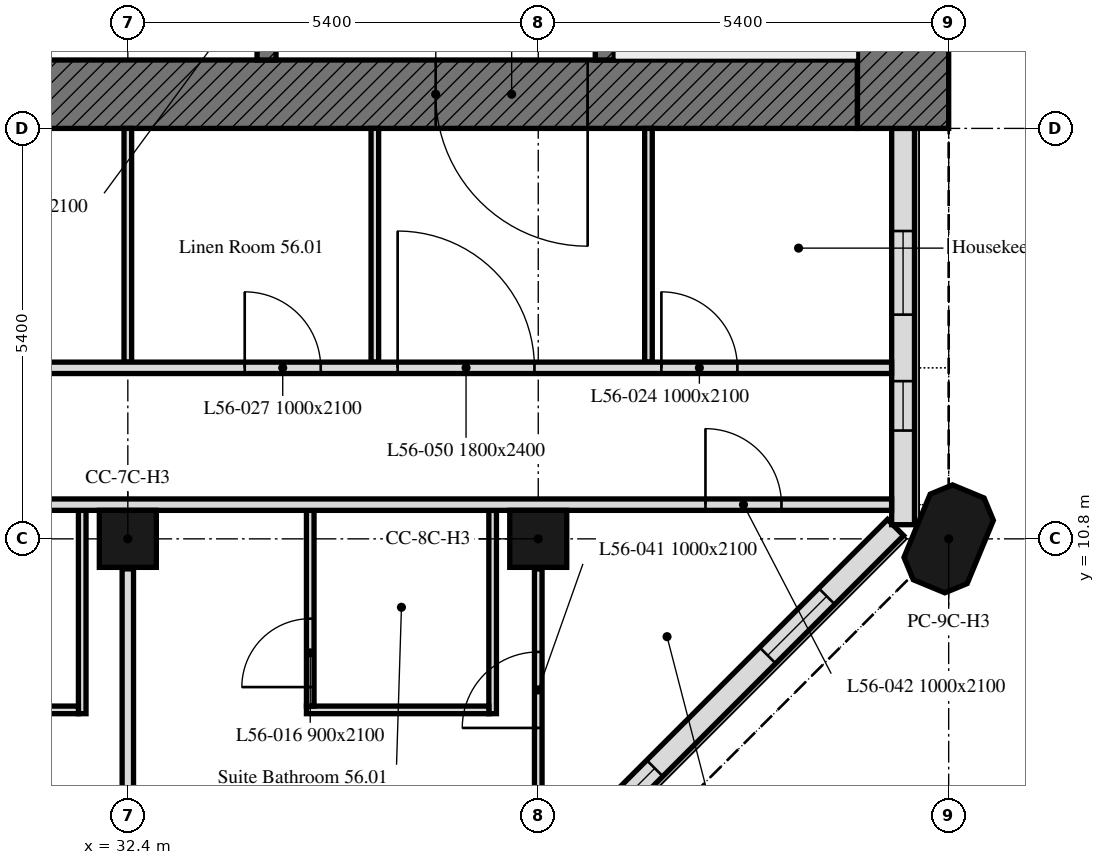
"""IFC4 building model, lengths in metres.
Left out: names, types, materials, properties, quantities, classifications, styles, units other than length and angle.
Written with IfcOpenShell. Run it as: python <this file> out.ifc"""

import sys

from ifc_helpers import new_model, si_unit, direction, frame, frame_2d, origin, origin_2d, place, context, subcontext, project, spatial, polyline, rectangle, outline, extrude, element, fill, save


model = new_model("IFC4")
c1 = context("Model", 3, precision=1e-05, world=origin(), true_north=direction((0.0, 1.0)))
c2 = subcontext(c1, "Body", "Model", "MODEL_VIEW")
j1 = project(units=[si_unit("LENGTHUNIT", "METRE"), si_unit("PLANEANGLEUNIT", "RADIAN")], contexts=[c1])
p1 = place(None, origin())
s1 = spatial("IfcSite", under=j1, at=p1, CompositionType="ELEMENT")
p2 = place(p1, origin())
s2 = spatial("IfcBuilding", under=s1, at=p2, CompositionType="ELEMENT")
p3 = place(p2, frame((0.0, 0.0, 223.6)))
s3 = spatial("IfcBuildingStorey", under=s2, at=p3, CompositionType="ELEMENT", Elevation=223.6)
for number, where, z_axis, x_axis in (
    (1, (32.4, 10.8, 0.0), (0.0, 0.0, 1.0), (1.0, 0.0, 0.0)),
    (2, (37.8, 10.8, 0.0), (0.0, 0.0, 1.0), (1.0, 0.0, 0.0)),
):
    element("IfcColumn", number, at=place(p3, frame(where, z_axis=z_axis, x_axis=x_axis)), inside=s3, PredefinedType="COLUMN", context=c2, shape_type="SweptSolid", body=[
        extrude(rectangle(XDim=0.75, YDim=0.75, at=origin_2d()), origin(), (0.0, 0.0, 1.0), 3.0),
    ])
p4 = place(p3, frame((43.2, 10.8, 0.0), z_axis=(0.0, 0.0, 1.0), x_axis=(0.382683432365, 0.923879532511, 0.0)))
e3 = element("IfcColumn", 3, at=p4, inside=s3, PredefinedType="COLUMN", context=c2, shape_type="SweptSolid", body=[
    extrude(outline(polyline([(-0.45, -0.45), (0.45, -0.45), (0.675, -0.225), (0.675, 0.225), (0.45, 0.45), (-0.45, 0.45), (-0.675, 0.225), (-0.675, -0.225), (-0.45, -0.45)])), origin(), (0.0, 0.0, 1.0), 3.0),
])
p5 = place(p3, frame((37.65, 6.099, 0.0), z_axis=(0.0, 0.0, 1.0), x_axis=(0.707106781187, 0.707106781187, 0.0)))
e4 = element("IfcWall", 4, at=p5, inside=s3, PredefinedType="SOLIDWALL", context=c2, shape_type="SweptSolid", body=[
    extrude(rectangle(XDim=6.86, YDim=0.3, at=frame_2d((3.43, 0.0))), origin(), (0.0, 0.0, 1.0), 3.0),
])
p6 = place(p5, frame((1.28, 0.0, 0.9)))
e5 = element("IfcOpeningElement", 5, at=p6, cuts=e4, PredefinedType="OPENING", context=c2, shape_type="SweptSolid", body=[
    extrude(rectangle(XDim=1.1, YDim=1.7, at=frame_2d((0.55, 0.85))), frame((0.0, 0.16, 0.0), z_axis=(0.0, -1.0, 0.0), x_axis=(1.0, 0.0, 0.0)), (0.0, 0.0, 1.0), 0.32),
])
p7 = place(p5, frame((4.48, 0.0, 0.9)))
e6 = element("IfcOpeningElement", 6, at=p7, cuts=e4, PredefinedType="OPENING", context=c2, shape_type="SweptSolid", body=[
    extrude(rectangle(XDim=1.1, YDim=1.7, at=frame_2d((0.55, 0.85))), frame((0.0, 0.16, 0.0), z_axis=(0.0, -1.0, 0.0), x_axis=(1.0, 0.0, 0.0)), (0.0, 0.0, 1.0), 0.32),
])
p8 = place(p3, frame((42.6, 10.986, 0.0), z_axis=(0.0, 0.0, 1.0), x_axis=(0.0, 1.0, 0.0)))
e7 = element("IfcWall", 7, at=p8, inside=s3, PredefinedType="SOLIDWALL", context=c2, shape_type="SweptSolid", body=[
    extrude(rectangle(XDim=5.214, YDim=0.3, at=frame_2d((2.607, 0.0))), origin(), (0.0, 0.0, 1.0), 3.0),
])
p9 = place(p8, frame((1.239, 0.0, 0.9)))
e8 = element("IfcOpeningElement", 8, at=p9, cuts=e7, PredefinedType="OPENING", context=c2, shape_type="SweptSolid", body=[
    extrude(rectangle(XDim=0.65, YDim=1.7, at=frame_2d((0.325, 0.85))), frame((0.0, 0.16, 0.0), z_axis=(0.0, -1.0, 0.0), x_axis=(1.0, 0.0, 0.0)), (0.0, 0.0, 1.0), 0.32),
])
p10 = place(p8, frame((2.764, 0.0, 0.9)))
e9 = element("IfcOpeningElement", 9, at=p10, cuts=e7, PredefinedType="OPENING", context=c2, shape_type="SweptSolid", body=[
    extrude(rectangle(XDim=1.1, YDim=1.7, at=frame_2d((0.55, 0.85))), frame((0.0, 0.16, 0.0), z_axis=(0.0, -1.0, 0.0), x_axis=(1.0, 0.0, 0.0)), (0.0, 0.0, 1.0), 0.32),
])
p11 = place(p3, frame((42.0, 16.65, 0.0), z_axis=(0.0, 0.0, 1.0), x_axis=(-1.0, 0.0, 0.0)))
e10 = element("IfcWall", 10, at=p11, inside=s3, PredefinedType="SOLIDWALL", context=c2, shape_type="SweptSolid", body=[
    extrude(rectangle(XDim=11.1, YDim=0.9, at=frame_2d((5.55, 0.0))), origin(), (0.0, 0.0, 1.0), 3.0),
])
p12 = place(p11, frame((3.55, 0.0, 0.0)))
e11 = element("IfcOpeningElement", 11, at=p12, cuts=e10, PredefinedType="OPENING", context=c2, shape_type="SweptSolid", body=[
    extrude(rectangle(XDim=2.0, YDim=2.4, at=frame_2d((1.0, 1.2))), frame((0.0, 0.45, 0.0), z_axis=(0.0, -1.0, 0.0), x_axis=(1.0, 0.0, 0.0)), (0.0, 0.0, 1.0), 0.9),
])
p13 = place(p3, frame((42.6, 32.4, 0.0), z_axis=(0.0, 0.0, 1.0), x_axis=(0.0, -1.0, 0.0)))
e12 = element("IfcWall", 12, at=p13, inside=s3, PredefinedType="SOLIDWALL", context=c2, shape_type="SweptSolid", body=[
    extrude(rectangle(XDim=16.2, YDim=1.2, at=frame_2d((8.1, 0.0))), origin(), (0.0, 0.0, 1.0), 3.0),
])
p14 = place(p3, frame((38.675, 17.1, 0.0), z_axis=(0.0, 0.0, 1.0), x_axis=(0.0, 1.0, 0.0)))
e13 = element("IfcWall", 13, at=p14, inside=s3, PredefinedType="SOLIDWALL", context=c2, shape_type="SweptSolid", body=[
    extrude(rectangle(XDim=14.4, YDim=0.25, at=frame_2d((7.2, 0.0))), origin(), (0.0, 0.0, 1.0), 3.0),
])
p15 = place(p14, frame((4.6, 0.0, 0.0)))
e14 = element("IfcOpeningElement", 14, at=p15, cuts=e13, PredefinedType="OPENING", context=c2, shape_type="SweptSolid", body=[
    extrude(rectangle(XDim=1.0, YDim=2.1, at=frame_2d((0.5, 1.05))), frame((0.0, 0.125, 0.0), z_axis=(0.0, -1.0, 0.0), x_axis=(1.0, 0.0, 0.0)), (0.0, 0.0, 1.0), 0.25),
])
p16 = place(p14, frame((7.062, 0.0, 0.0)))
e15 = element("IfcOpeningElement", 15, at=p16, cuts=e13, PredefinedType="OPENING", context=c2, shape_type="SweptSolid", body=[
    extrude(rectangle(XDim=1.2, YDim=2.1, at=frame_2d((0.6, 1.05))), frame((0.0, 0.125, 0.0), z_axis=(0.0, -1.0, 0.0), x_axis=(1.0, 0.0, 0.0)), (0.0, 0.0, 1.0), 0.25),
])
p17 = place(p14, frame((9.726, 0.0, 0.0)))
e16 = element("IfcOpeningElement", 16, at=p17, cuts=e13, PredefinedType="OPENING", context=c2, shape_type="SweptSolid", body=[
    extrude(rectangle(XDim=0.9, YDim=2.1, at=frame_2d((0.45, 1.05))), frame((0.0, 0.125, 0.0), z_axis=(0.0, -1.0, 0.0), x_axis=(1.0, 0.0, 0.0)), (0.0, 0.0, 1.0), 0.25),
])
p18 = place(p14, frame((11.539, 0.0, 0.0)))
e17 = element("IfcOpeningElement", 17, at=p18, cuts=e13, PredefinedType="OPENING", context=c2, shape_type="SweptSolid", body=[
    extrude(rectangle(XDim=0.9, YDim=2.1, at=frame_2d((0.45, 1.05))), frame((0.0, 0.125, 0.0), z_axis=(0.0, -1.0, 0.0), x_axis=(1.0, 0.0, 0.0)), (0.0, 0.0, 1.0), 0.25),
])
p19 = place(p14, frame((13.226, 0.0, 0.0)))
e18 = element("IfcOpeningElement", 18, at=p19, cuts=e13, PredefinedType="OPENING", context=c2, shape_type="SweptSolid", body=[
    extrude(rectangle(XDim=0.9, YDim=2.1, at=frame_2d((0.45, 1.05))), frame((0.0, 0.125, 0.0), z_axis=(0.0, -1.0, 0.0), x_axis=(1.0, 0.0, 0.0)), (0.0, 0.0, 1.0), 0.25),
])
p20 = place(p3, frame((34.225, 17.1, 0.0), z_axis=(0.0, 0.0, 1.0), x_axis=(0.0, 1.0, 0.0)))
e19 = element("IfcWall", 19, at=p20, inside=s3, PredefinedType="SOLIDWALL", context=c2, shape_type="SweptSolid", body=[
    extrude(rectangle(XDim=14.4, YDim=0.25, at=frame_2d((7.2, 0.0))), origin(), (0.0, 0.0, 1.0), 3.0),
])
p21 = place(p20, frame((13.15, 0.0, 0.0)))
e20 = element("IfcOpeningElement", 20, at=p21, cuts=e19, PredefinedType="OPENING", context=c2, shape_type="SweptSolid", body=[
    extrude(rectangle(XDim=1.0, YDim=2.1, at=frame_2d((0.5, 1.05))), frame((0.0, 0.125, 0.0), z_axis=(0.0, -1.0, 0.0), x_axis=(1.0, 0.0, 0.0)), (0.0, 0.0, 1.0), 0.25),
])
p22 = place(p20, frame((0.6, 0.0, 0.0)))
e21 = element("IfcOpeningElement", 21, at=p22, cuts=e19, PredefinedType="OPENING", context=c2, shape_type="SweptSolid", body=[
    extrude(rectangle(XDim=1.1, YDim=2.1, at=frame_2d((0.55, 1.05))), frame((0.0, 0.125, 0.0), z_axis=(0.0, -1.0, 0.0), x_axis=(1.0, 0.0, 0.0)), (0.0, 0.0, 1.0), 0.25),
])
p23 = place(p20, frame((3.25, 0.0, 0.0)))
e22 = element("IfcOpeningElement", 22, at=p23, cuts=e19, PredefinedType="OPENING", context=c2, shape_type="SweptSolid", body=[
    extrude(rectangle(XDim=0.9, YDim=2.1, at=frame_2d((0.45, 1.05))), frame((0.0, 0.125, 0.0), z_axis=(0.0, -1.0, 0.0), x_axis=(1.0, 0.0, 0.0)), (0.0, 0.0, 1.0), 0.25),
])
p24 = place(p3, frame((37.8, 6.512, 0.0), z_axis=(0.0, 0.0, 1.0), x_axis=(0.0, 1.0, 0.0)))
e23 = element("IfcWall", 23, at=p24, inside=s3, PredefinedType="PARTITIONING", context=c2, shape_type="SweptSolid", body=[
    extrude(rectangle(XDim=3.893, YDim=0.1, at=frame_2d((1.946, 0.0))), origin(), (0.0, 0.0, 1.0), 3.0),
])
p25 = place(p24, frame((1.8, 0.0, 0.0)))
e24 = element("IfcOpeningElement", 24, at=p25, cuts=e23, PredefinedType="OPENING", context=c2, shape_type="SweptSolid", body=[
    extrude(rectangle(XDim=1.0, YDim=2.1, at=frame_2d((0.5, 1.05))), frame((0.0, 0.05, 0.0), z_axis=(0.0, -1.0, 0.0), x_axis=(1.0, 0.0, 0.0)), (0.0, 0.0, 1.0), 0.1),
])
p26 = place(p3, frame((37.2, 11.175, 0.0), z_axis=(0.0, 0.0, 1.0), x_axis=(0.0, -1.0, 0.0)))
e25 = element("IfcWall", 25, at=p26, inside=s3, PredefinedType="PARTITIONING", context=c2, shape_type="SweptSolid", body=[
    extrude(rectangle(XDim=2.675, YDim=0.1, at=frame_2d((1.337, 0.0))), origin(), (0.0, 0.0, 1.0), 3.0),
])
p27 = place(p3, frame((37.15, 8.55, 0.0), z_axis=(0.0, 0.0, 1.0), x_axis=(-1.0, 0.0, 0.0)))
e26 = element("IfcWall", 26, at=p27, inside=s3, PredefinedType="PARTITIONING", context=c2, shape_type="SweptSolid", body=[
    extrude(rectangle(XDim=2.4, YDim=0.1, at=frame_2d((1.2, 0.0))), origin(), (0.0, 0.0, 1.0), 3.0),
])
p28 = place(p3, frame((34.8, 8.6, 0.0), z_axis=(0.0, 0.0, 1.0), x_axis=(0.0, 1.0, 0.0)))
e27 = element("IfcWall", 27, at=p28, inside=s3, PredefinedType="PARTITIONING", context=c2, shape_type="SweptSolid", body=[
    extrude(rectangle(XDim=2.575, YDim=0.1, at=frame_2d((1.288, 0.0))), origin(), (0.0, 0.0, 1.0), 3.0),
])
p29 = place(p28, frame((0.25, 0.0, 0.0)))
e28 = element("IfcOpeningElement", 28, at=p29, cuts=e27, PredefinedType="OPENING", context=c2, shape_type="SweptSolid", body=[
    extrude(rectangle(XDim=0.9, YDim=2.1, at=frame_2d((0.45, 1.05))), frame((0.0, 0.05, 0.0), z_axis=(0.0, -1.0, 0.0), x_axis=(1.0, 0.0, 0.0)), (0.0, 0.0, 1.0), 0.1),
])
p30 = place(p3, frame((32.4, 10.405, 0.0), z_axis=(0.0, 0.0, 1.0), x_axis=(0.0, -1.0, 0.0)))
e29 = element("IfcWall", 29, at=p30, inside=s3, PredefinedType="PARTITIONING", context=c2, shape_type="SweptSolid", body=[
    extrude(rectangle(XDim=4.254, YDim=0.15, at=frame_2d((2.127, 0.0))), origin(), (0.0, 0.0, 1.0), 3.0),
])
p31 = place(p3, frame((31.8, 11.175, 0.0), z_axis=(0.0, 0.0, 1.0), x_axis=(0.0, -1.0, 0.0)))
e30 = element("IfcWall", 30, at=p31, inside=s3, PredefinedType="PARTITIONING", context=c2, shape_type="SweptSolid", body=[
    extrude(rectangle(XDim=2.675, YDim=0.1, at=frame_2d((1.337, 0.0))), origin(), (0.0, 0.0, 1.0), 3.0),
])
p32 = place(p3, frame((31.75, 8.55, 0.0), z_axis=(0.0, 0.0, 1.0), x_axis=(-1.0, 0.0, 0.0)))
e31 = element("IfcWall", 31, at=p32, inside=s3, PredefinedType="PARTITIONING", context=c2, shape_type="SweptSolid", body=[
    extrude(rectangle(XDim=2.1, YDim=0.1, at=frame_2d((1.05, 0.0))), origin(), (0.0, 0.0, 1.0), 3.0),
])
p33 = place(p3, frame((0.751, 11.25, 0.0), z_axis=(0.0, 0.0, 1.0), x_axis=(1.0, 0.0, 0.0)))
e32 = element("IfcWall", 32, at=p33, inside=s3, PredefinedType="PARTITIONING", context=c2, shape_type="SweptSolid", body=[
    extrude(rectangle(XDim=41.698, YDim=0.15, at=frame_2d((20.849, 0.0))), origin(), (0.0, 0.0, 1.0), 3.0),
])
p34 = place(p33, frame((39.249, 0.0, 0.0)))
e33 = element("IfcOpeningElement", 33, at=p34, cuts=e32, PredefinedType="OPENING", context=c2, shape_type="SweptSolid", body=[
    extrude(rectangle(XDim=1.0, YDim=2.1, at=frame_2d((0.5, 1.05))), frame((0.0, 0.075, 0.0), z_axis=(0.0, -1.0, 0.0), x_axis=(1.0, 0.0, 0.0)), (0.0, 0.0, 1.0), 0.15),
])
p35 = place(p33, frame((27.649, 0.0, 0.0)))
e34 = element("IfcOpeningElement", 34, at=p35, cuts=e32, PredefinedType="OPENING", context=c2, shape_type="SweptSolid", body=[
    extrude(rectangle(XDim=1.0, YDim=2.1, at=frame_2d((0.5, 1.05))), frame((0.0, 0.075, 0.0), z_axis=(0.0, -1.0, 0.0), x_axis=(1.0, 0.0, 0.0)), (0.0, 0.0, 1.0), 0.15),
])
p36 = place(p33, frame((23.049, 0.0, 0.0)))
e35 = element("IfcOpeningElement", 35, at=p36, cuts=e32, PredefinedType="OPENING", context=c2, shape_type="SweptSolid", body=[
    extrude(rectangle(XDim=1.0, YDim=2.1, at=frame_2d((0.5, 1.05))), frame((0.0, 0.075, 0.0), z_axis=(0.0, -1.0, 0.0), x_axis=(1.0, 0.0, 0.0)), (0.0, 0.0, 1.0), 0.15),
])
p37 = place(p33, frame((11.449, 0.0, 0.0)))
e36 = element("IfcOpeningElement", 36, at=p37, cuts=e32, PredefinedType="OPENING", context=c2, shape_type="SweptSolid", body=[
    extrude(rectangle(XDim=1.0, YDim=2.1, at=frame_2d((0.5, 1.05))), frame((0.0, 0.075, 0.0), z_axis=(0.0, -1.0, 0.0), x_axis=(1.0, 0.0, 0.0)), (0.0, 0.0, 1.0), 0.15),
])
p38 = place(p33, frame((2.744, 0.0, 0.0)))
e37 = element("IfcOpeningElement", 37, at=p38, cuts=e32, PredefinedType="OPENING", context=c2, shape_type="SweptSolid", body=[
    extrude(rectangle(XDim=1.0, YDim=2.1, at=frame_2d((0.5, 1.05))), frame((0.0, 0.075, 0.0), z_axis=(0.0, -1.0, 0.0), x_axis=(1.0, 0.0, 0.0)), (0.0, 0.0, 1.0), 0.15),
])
for number, where, z_axis, x_axis in (
    (38, (32.4, 13.125, 0.0), (0.0, 0.0, 1.0), (0.0, 1.0, 0.0)),
    (39, (39.25, 13.125, 0.0), (0.0, 0.0, 1.0), (0.0, 1.0, 0.0)),
    (40, (35.65, 16.2, 0.0), (0.0, 0.0, 1.0), (0.0, -1.0, 0.0)),
):
    element("IfcWall", number, at=place(p3, frame(where, z_axis=z_axis, x_axis=x_axis)), inside=s3, PredefinedType="PARTITIONING", context=c2, shape_type="SweptSolid", body=[
        extrude(rectangle(XDim=3.075, YDim=0.1, at=frame_2d((1.538, 0.0))), origin(), (0.0, 0.0, 1.0), 3.0),
    ])
p39 = place(p3, frame((5.325, 13.05, 0.0), z_axis=(0.0, 0.0, 1.0), x_axis=(1.0, 0.0, 0.0)))
e41 = element("IfcWall", 41, at=p39, inside=s3, PredefinedType="PARTITIONING", context=c2, shape_type="SweptSolid", body=[
    extrude(rectangle(XDim=37.124, YDim=0.15, at=frame_2d((18.562, 0.0))), origin(), (0.0, 0.0, 1.0), 3.0),
])
p40 = place(p39, frame((23.875, 0.0, 0.0)))
e42 = element("IfcOpeningElement", 42, at=p40, cuts=e41, PredefinedType="OPENING", context=c2, shape_type="SweptSolid", body=[
    extrude(rectangle(XDim=1.0, YDim=2.1, at=frame_2d((0.5, 1.05))), frame((0.0, 0.075, 0.0), z_axis=(0.0, -1.0, 0.0), x_axis=(1.0, 0.0, 0.0)), (0.0, 0.0, 1.0), 0.15),
])
p41 = place(p39, frame((13.475, 0.0, 0.0)))
e43 = element("IfcOpeningElement", 43, at=p41, cuts=e41, PredefinedType="OPENING", context=c2, shape_type="SweptSolid", body=[
    extrude(rectangle(XDim=1.0, YDim=2.1, at=frame_2d((0.5, 1.05))), frame((0.0, 0.075, 0.0), z_axis=(0.0, -1.0, 0.0), x_axis=(1.0, 0.0, 0.0)), (0.0, 0.0, 1.0), 0.15),
])
p42 = place(p39, frame((34.095, 0.0, 0.0)))
e44 = element("IfcOpeningElement", 44, at=p42, cuts=e41, PredefinedType="OPENING", context=c2, shape_type="SweptSolid", body=[
    extrude(rectangle(XDim=1.0, YDim=2.1, at=frame_2d((0.5, 1.05))), frame((0.0, 0.075, 0.0), z_axis=(0.0, -1.0, 0.0), x_axis=(1.0, 0.0, 0.0)), (0.0, 0.0, 1.0), 0.15),
])
p43 = place(p39, frame((8.337, 0.0, 0.0)))
e45 = element("IfcOpeningElement", 45, at=p43, cuts=e41, PredefinedType="OPENING", context=c2, shape_type="SweptSolid", body=[
    extrude(rectangle(XDim=1.0, YDim=2.1, at=frame_2d((0.5, 1.05))), frame((0.0, 0.075, 0.0), z_axis=(0.0, -1.0, 0.0), x_axis=(1.0, 0.0, 0.0)), (0.0, 0.0, 1.0), 0.15),
])
p44 = place(p39, frame((1.648, 0.0, 0.0)))
e46 = element("IfcOpeningElement", 46, at=p44, cuts=e41, PredefinedType="OPENING", context=c2, shape_type="SweptSolid", body=[
    extrude(rectangle(XDim=1.0, YDim=2.1, at=frame_2d((0.5, 1.05))), frame((0.0, 0.075, 0.0), z_axis=(0.0, -1.0, 0.0), x_axis=(1.0, 0.0, 0.0)), (0.0, 0.0, 1.0), 0.15),
])
p45 = place(p39, frame((28.613, 0.0, 0.0)))
e47 = element("IfcOpeningElement", 47, at=p45, cuts=e41, PredefinedType="OPENING", context=c2, shape_type="SweptSolid", body=[
    extrude(rectangle(XDim=1.0, YDim=2.1, at=frame_2d((0.5, 1.05))), frame((0.0, 0.075, 0.0), z_axis=(0.0, -1.0, 0.0), x_axis=(1.0, 0.0, 0.0)), (0.0, 0.0, 1.0), 0.15),
])
p46 = place(p39, frame((30.625, 0.0, 0.0)))
e48 = element("IfcOpeningElement", 48, at=p46, cuts=e41, PredefinedType="OPENING", context=c2, shape_type="SweptSolid", body=[
    extrude(rectangle(XDim=1.8, YDim=2.4, at=frame_2d((0.9, 1.2))), frame((0.0, 0.075, 0.0), z_axis=(0.0, -1.0, 0.0), x_axis=(1.0, 0.0, 0.0)), (0.0, 0.0, 1.0), 0.15),
])
p47 = place(p39, frame((5.525, 0.0, 0.0)))
e49 = element("IfcOpeningElement", 49, at=p47, cuts=e41, PredefinedType="OPENING", context=c2, shape_type="SweptSolid", body=[
    extrude(rectangle(XDim=1.8, YDim=2.4, at=frame_2d((0.9, 1.2))), frame((0.0, 0.075, 0.0), z_axis=(0.0, -1.0, 0.0), x_axis=(1.0, 0.0, 0.0)), (0.0, 0.0, 1.0), 0.15),
])
p48 = place(p6, origin())
e50 = element("IfcWindow", 50, at=p48, inside=s3, PartitioningType="SINGLE_PANEL", PredefinedType="WINDOW", context=c2, shape_type="SweptSolid", body=[
    extrude(rectangle(XDim=1.1, YDim=1.7, at=frame_2d((0.55, 0.85))), frame((0.0, 0.03, 0.0), z_axis=(0.0, -1.0, 0.0), x_axis=(1.0, 0.0, 0.0)), (0.0, 0.0, 1.0), 0.06),
])
fill(e5, e50)
p49 = place(p7, origin())
e51 = element("IfcWindow", 51, at=p49, inside=s3, PartitioningType="SINGLE_PANEL", PredefinedType="WINDOW", context=c2, shape_type="SweptSolid", body=[
    extrude(rectangle(XDim=1.1, YDim=1.7, at=frame_2d((0.55, 0.85))), frame((0.0, 0.03, 0.0), z_axis=(0.0, -1.0, 0.0), x_axis=(1.0, 0.0, 0.0)), (0.0, 0.0, 1.0), 0.06),
])
fill(e6, e51)
p50 = place(p9, origin())
e52 = element("IfcWindow", 52, at=p50, inside=s3, PartitioningType="SINGLE_PANEL", PredefinedType="WINDOW", context=c2, shape_type="SweptSolid", body=[
    extrude(rectangle(XDim=0.65, YDim=1.7, at=frame_2d((0.325, 0.85))), frame((0.0, 0.03, 0.0), z_axis=(0.0, -1.0, 0.0), x_axis=(1.0, 0.0, 0.0)), (0.0, 0.0, 1.0), 0.06),
])
fill(e8, e52)
p51 = place(p10, origin())
e53 = element("IfcWindow", 53, at=p51, inside=s3, PartitioningType="SINGLE_PANEL", PredefinedType="WINDOW", context=c2, shape_type="SweptSolid", body=[
    extrude(rectangle(XDim=1.1, YDim=1.7, at=frame_2d((0.55, 0.85))), frame((0.0, 0.03, 0.0), z_axis=(0.0, -1.0, 0.0), x_axis=(1.0, 0.0, 0.0)), (0.0, 0.0, 1.0), 0.06),
])
fill(e9, e53)
p52 = place(p12, origin())
e54 = element("IfcDoor", 54, at=p52, inside=s3, OperationType="DOUBLE_DOOR_SINGLE_SWING", PredefinedType="DOOR", context=c2, shape_type="SweptSolid", body=[
    extrude(rectangle(XDim=2.0, YDim=2.4, at=frame_2d((1.0, 1.2))), frame((0.0, 0.025, 0.0), z_axis=(0.0, -1.0, 0.0), x_axis=(1.0, 0.0, 0.0)), (0.0, 0.0, 1.0), 0.05),
])
fill(e11, e54)
p53 = place(p29, origin())
e55 = element("IfcDoor", 55, at=p53, inside=s3, OperationType="SINGLE_SWING_RIGHT", PredefinedType="DOOR", context=c2, shape_type="SweptSolid", body=[
    extrude(rectangle(XDim=0.9, YDim=2.1, at=frame_2d((0.45, 1.05))), frame((0.0, 0.025, 0.0), z_axis=(0.0, -1.0, 0.0), x_axis=(1.0, 0.0, 0.0)), (0.0, 0.0, 1.0), 0.05),
])
fill(e28, e55)
p54 = place(p42, origin())
e56 = element("IfcDoor", 56, at=p54, inside=s3, OperationType="SINGLE_SWING_RIGHT", PredefinedType="DOOR", context=c2, shape_type="SweptSolid", body=[
    extrude(rectangle(XDim=1.0, YDim=2.1, at=frame_2d((0.5, 1.05))), frame((0.0, 0.025, 0.0), z_axis=(0.0, -1.0, 0.0), x_axis=(1.0, 0.0, 0.0)), (0.0, 0.0, 1.0), 0.05),
])
fill(e44, e56)
p55 = place(p45, origin())
e57 = element("IfcDoor", 57, at=p55, inside=s3, OperationType="SINGLE_SWING_LEFT", PredefinedType="DOOR", context=c2, shape_type="SweptSolid", body=[
    extrude(rectangle(XDim=1.0, YDim=2.1, at=frame_2d((0.5, 1.05))), frame((0.0, 0.025, 0.0), z_axis=(0.0, -1.0, 0.0), x_axis=(1.0, 0.0, 0.0)), (0.0, 0.0, 1.0), 0.05),
])
fill(e47, e57)
p56 = place(p25, origin())
e58 = element("IfcDoor", 58, at=p56, inside=s3, OperationType="SINGLE_SWING_RIGHT", PredefinedType="DOOR", context=c2, shape_type="SweptSolid", body=[
    extrude(rectangle(XDim=1.0, YDim=2.1, at=frame_2d((0.5, 1.05))), frame((0.0, 0.025, 0.0), z_axis=(0.0, -1.0, 0.0), x_axis=(1.0, 0.0, 0.0)), (0.0, 0.0, 1.0), 0.05),
])
fill(e24, e58)
p57 = place(p34, origin())
e59 = element("IfcDoor", 59, at=p57, inside=s3, OperationType="SINGLE_SWING_LEFT", PredefinedType="DOOR", context=c2, shape_type="SweptSolid", body=[
    extrude(rectangle(XDim=1.0, YDim=2.1, at=frame_2d((0.5, 1.05))), frame((0.0, 0.025, 0.0), z_axis=(0.0, -1.0, 0.0), x_axis=(1.0, 0.0, 0.0)), (0.0, 0.0, 1.0), 0.05),
])
fill(e33, e59)
p58 = place(p46, origin())
e60 = element("IfcDoor", 60, at=p58, inside=s3, OperationType="DOUBLE_DOOR_SINGLE_SWING", PredefinedType="DOOR", context=c2, shape_type="SweptSolid", body=[
    extrude(rectangle(XDim=1.8, YDim=2.4, at=frame_2d((0.9, 1.2))), frame((0.0, 0.025, 0.0), z_axis=(0.0, -1.0, 0.0), x_axis=(1.0, 0.0, 0.0)), (0.0, 0.0, 1.0), 0.05),
])
fill(e48, e60)
save(model, sys.argv[1])
